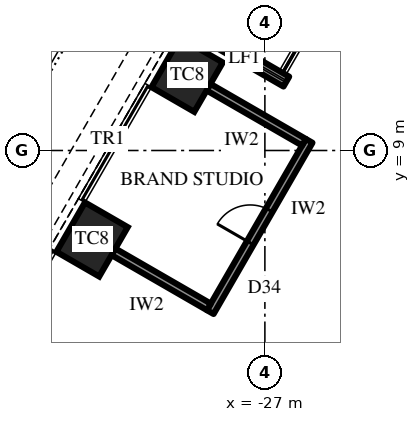
"""IFC4 building model, lengths in metres.
Left out: names, types, materials, properties, quantities, classifications, styles, units other than length and angle.
Written with IfcOpenShell. Run it as: python <this file> out.ifc"""

import sys

from ifc_helpers import new_model, si_unit, direction, frame, frame_2d, origin, origin_2d, place, context, subcontext, project, spatial, rectangle, extrude, element, fill, save


model = new_model("IFC4")
c1 = context("Model", 3, precision=1e-05, world=origin(), true_north=direction((0.0, 1.0)))
c2 = subcontext(c1, "Body", "Model", "MODEL_VIEW")
j1 = project(units=[si_unit("LENGTHUNIT", "METRE"), si_unit("PLANEANGLEUNIT", "RADIAN")], contexts=[c1])
p1 = place(None, origin())
s1 = spatial("IfcSite", under=j1, at=p1, CompositionType="ELEMENT")
p2 = place(p1, origin())
s2 = spatial("IfcBuilding", under=s1, at=p2, CompositionType="ELEMENT")
p3 = place(p2, frame((0.0, 0.0, 182.5)))
s3 = spatial("IfcBuildingStorey", under=s2, at=p3, CompositionType="ELEMENT", Elevation=182.5)
for number, where, z_axis, x_axis in (
    (1, (-29.045, 10.992, 0.0), (0.0, 0.0, 1.0), (-0.5, -0.866, 0.0)),
    (2, (-31.547, 6.658, 0.0), (0.0, 0.0, 1.0), (-0.5, -0.866, 0.0)),
):
    element("IfcColumn", number, at=place(p3, frame(where, z_axis=z_axis, x_axis=x_axis)), inside=s3, PredefinedType="COLUMN", context=c2, shape_type="SweptSolid", body=[
        extrude(rectangle(XDim=1.5, YDim=1.3, at=origin_2d()), origin(), (0.0, 0.0, 1.0), 4.2),
    ])
p4 = place(p3, frame((-29.12, 12.363, 0.0), z_axis=(0.0, 0.0, 1.0), x_axis=(0.86602952684, -0.49999285859, 0.0)))
e3 = element("IfcWall", 3, at=p4, inside=s3, PredefinedType="SOLIDWALL", context=c2, shape_type="SweptSolid", body=[
    extrude(rectangle(XDim=3.1, YDim=0.3, at=frame_2d((1.55, 0.0))), origin(), (0.0, 0.0, 1.0), 2.75),
])
p5 = place(p3, frame((-25.834, 9.253, 0.0), z_axis=(0.0, 0.0, 1.0), x_axis=(-0.500009456303, -0.866019944116, 0.0)))
e4 = element("IfcWall", 4, at=p5, inside=s3, PredefinedType="PARTITIONING", context=c2, shape_type="SweptSolid", body=[
    extrude(rectangle(XDim=5.204, YDim=0.2, at=frame_2d((2.602, 0.0))), origin(), (0.0, 0.0, 1.0), 4.0),
])
p6 = place(p5, frame((2.102, 0.0, 0.0)))
e5 = element("IfcOpeningElement", 5, at=p6, cuts=e4, PredefinedType="OPENING", context=c2, shape_type="SweptSolid", body=[
    extrude(rectangle(XDim=1.0, YDim=2.2, at=frame_2d((0.5, 1.1))), frame((0.0, 0.11, 0.0), z_axis=(0.0, -1.0, 0.0), x_axis=(1.0, 0.0, 0.0)), (0.0, 0.0, 1.0), 0.22),
])
p7 = place(p3, frame((-25.971, 9.217, 0.0), z_axis=(0.0, 0.0, 1.0), x_axis=(-0.865996321171, 0.50005036918, 0.0)))
e6 = element("IfcWall", 6, at=p7, inside=s3, PredefinedType="PARTITIONING", context=c2, shape_type="SweptSolid", body=[
    extrude(rectangle(XDim=2.9, YDim=0.2, at=frame_2d((1.45, 0.0))), origin(), (0.0, 0.0, 1.0), 3.082),
])
p8 = place(p3, frame((-28.473, 4.883, 0.0), z_axis=(0.0, 0.0, 1.0), x_axis=(-0.866032775405, 0.499987231761, 0.0)))
e7 = element("IfcWall", 7, at=p8, inside=s3, PredefinedType="PARTITIONING", context=c2, shape_type="SweptSolid", body=[
    extrude(rectangle(XDim=2.9, YDim=0.2, at=frame_2d((1.45, 0.0))), origin(), (0.0, 0.0, 1.0), 3.082),
])
p9 = place(p6, frame((1.0, 0.0, 0.0), z_axis=(0.0, 0.0, 1.0), x_axis=(-1.0, 0.0, 0.0)))
e8 = element("IfcDoor", 8, at=p9, inside=s3, OperationType="SINGLE_SWING_RIGHT", PredefinedType="DOOR", context=c2, shape_type="SweptSolid", body=[
    extrude(rectangle(XDim=1.0, YDim=2.2, at=frame_2d((0.5, 1.1))), frame((0.0, 0.025, 0.0), z_axis=(0.0, -1.0, 0.0), x_axis=(1.0, 0.0, 0.0)), (0.0, 0.0, 1.0), 0.05),
])
fill(e5, e8)
save(model, sys.argv[1])
